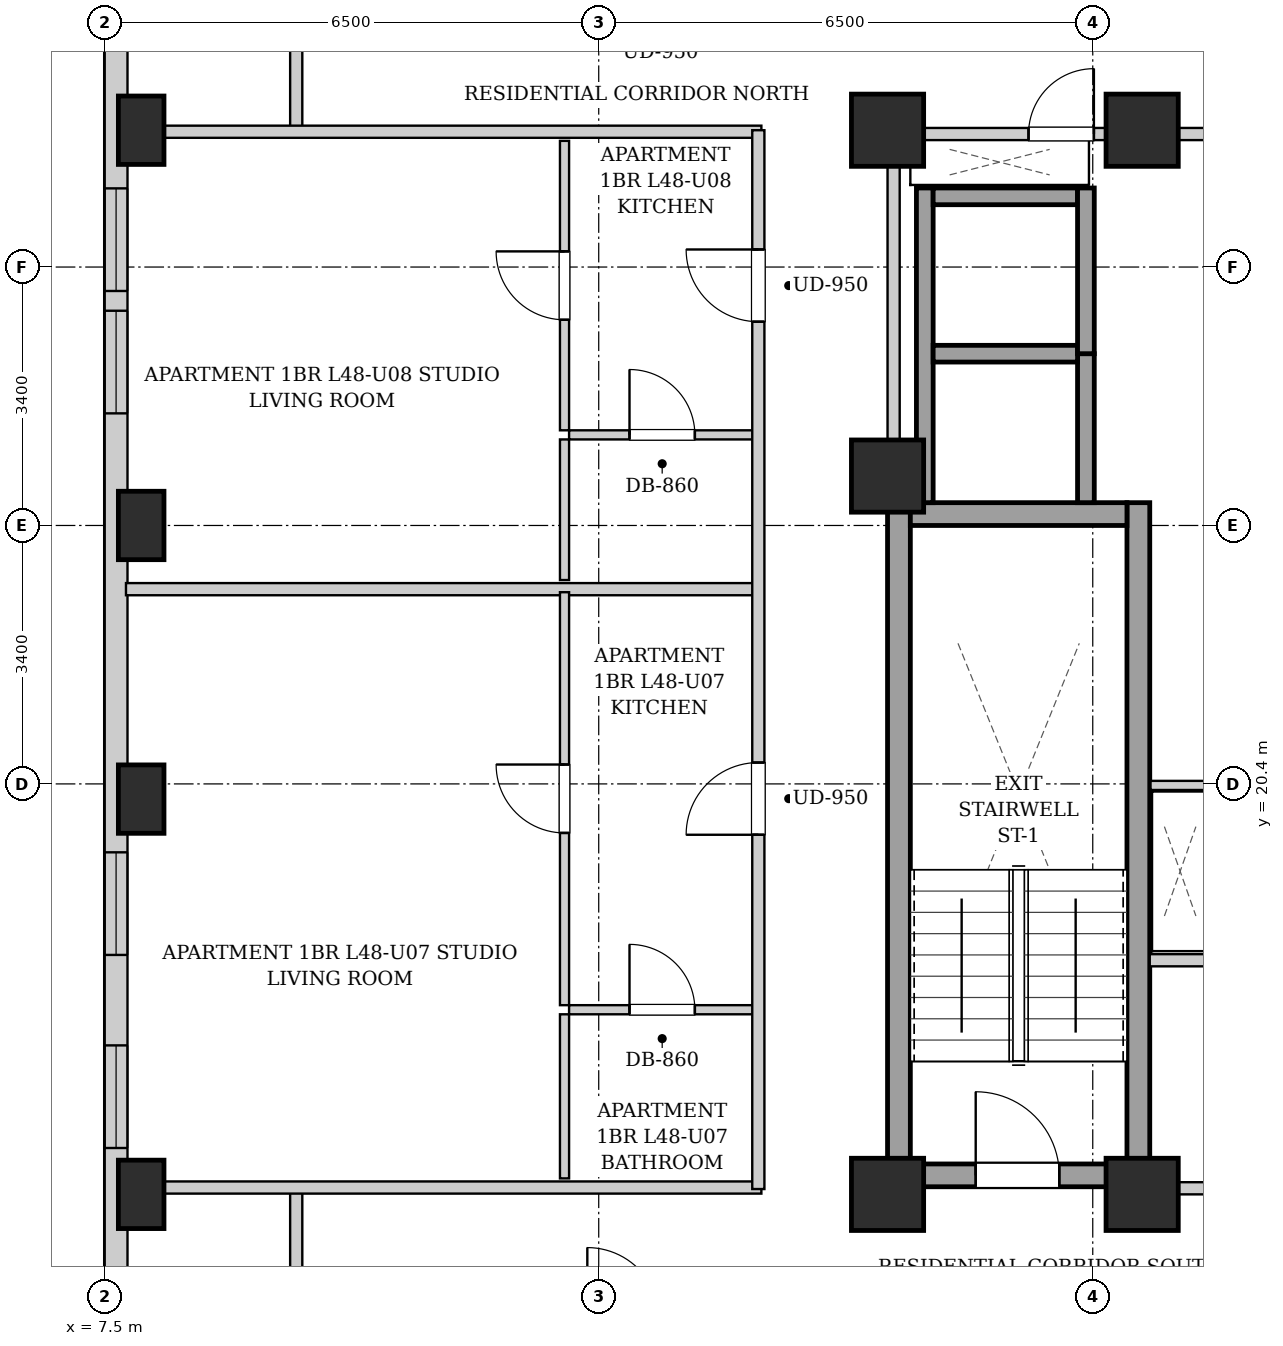
"""IFC4 building model, lengths in metres.
Left out: names, types, materials, properties, quantities, classifications, styles, units other than length and angle.
Written with IfcOpenShell. Run it as: python <this file> out.ifc"""

import sys

from ifc_helpers import new_model, si_unit, direction, frame, frame_2d, origin, origin_2d, place, context, subcontext, project, spatial, rectangle, extrude, element, fill, save


model = new_model("IFC4")
c1 = context("Model", 3, precision=1e-05, world=origin(), true_north=direction((0.0, 1.0)))
c2 = subcontext(c1, "Body", "Model", "MODEL_VIEW")
j1 = project(units=[si_unit("LENGTHUNIT", "METRE"), si_unit("PLANEANGLEUNIT", "RADIAN")], contexts=[c1])
p1 = place(None, origin())
s1 = spatial("IfcSite", under=j1, at=p1, CompositionType="ELEMENT")
p2 = place(p1, origin())
s2 = spatial("IfcBuilding", under=s1, at=p2, CompositionType="ELEMENT")
p3 = place(p2, frame((0.0, 0.0, 166.65)))
s3 = spatial("IfcBuildingStorey", under=s2, at=p3, CompositionType="ELEMENT", Elevation=166.65)
for number, where, z_axis, x_axis in (
    (1, (7.98, 15.0, 0.0), (0.0, 0.0, 1.0), (1.0, 0.0, 0.0)),
    (2, (7.98, 20.2, 0.0), (0.0, 0.0, 1.0), (1.0, 0.0, 0.0)),
    (3, (7.98, 23.8, 0.0), (0.0, 0.0, 1.0), (1.0, 0.0, 0.0)),
    (4, (7.98, 29.0, 0.0), (0.0, 0.0, 1.0), (1.0, 0.0, 0.0)),
):
    element("IfcColumn", number, at=place(p3, frame(where, z_axis=z_axis, x_axis=x_axis)), inside=s3, PredefinedType="COLUMN", context=c2, shape_type="SweptSolid", body=[
        extrude(rectangle(XDim=0.6, YDim=0.9, at=origin_2d()), origin(), (0.0, 0.0, 1.0), 3.25),
    ])
for number, where, z_axis, x_axis in (
    (5, (17.8, 15.0, 0.0), (0.0, 0.0, 1.0), (1.0, 0.0, 0.0)),
    (6, (21.15, 15.0, 0.0), (0.0, 0.0, 1.0), (1.0, 0.0, 0.0)),
    (7, (17.8, 29.0, 0.0), (0.0, 0.0, 1.0), (1.0, 0.0, 0.0)),
    (8, (21.15, 29.0, 0.0), (0.0, 0.0, 1.0), (1.0, 0.0, 0.0)),
    (9, (17.8, 24.45, 0.0), (0.0, 0.0, 1.0), (1.0, 0.0, 0.0)),
):
    element("IfcColumn", number, at=place(p3, frame(where, z_axis=z_axis, x_axis=x_axis)), inside=s3, PredefinedType="COLUMN", context=c2, shape_type="SweptSolid", body=[
        extrude(rectangle(XDim=0.95, YDim=0.95, at=origin_2d()), origin(), (0.0, 0.0, 1.0), 3.25),
    ])
p4 = place(p3, frame((7.65, 6.3, 0.0), z_axis=(0.0, 0.0, 1.0), x_axis=(0.0, 1.0, 0.0)))
e10 = element("IfcWall", 10, at=p4, inside=s3, PredefinedType="SOLIDWALL", context=c2, shape_type="SweptSolid", body=[
    extrude(rectangle(XDim=34.5, YDim=0.3, at=frame_2d((17.25, 0.0))), origin(), (0.0, 0.0, 1.0), 2.93),
])
p5 = place(p4, frame((1.425, 0.0, 0.55)))
e11 = element("IfcOpeningElement", 11, at=p5, cuts=e10, PredefinedType="OPENING", context=c2, shape_type="SweptSolid", body=[
    extrude(rectangle(XDim=1.35, YDim=1.2, at=frame_2d((0.675, 0.6))), frame((0.0, 0.16, 0.0), z_axis=(0.0, -1.0, 0.0), x_axis=(1.0, 0.0, 0.0)), (0.0, 0.0, 1.0), 0.32),
])
p6 = place(p4, frame((30.15, 0.0, 0.55)))
e12 = element("IfcOpeningElement", 12, at=p6, cuts=e10, PredefinedType="OPENING", context=c2, shape_type="SweptSolid", body=[
    extrude(rectangle(XDim=1.35, YDim=1.2, at=frame_2d((0.675, 0.6))), frame((0.0, 0.16, 0.0), z_axis=(0.0, -1.0, 0.0), x_axis=(1.0, 0.0, 0.0)), (0.0, 0.0, 1.0), 0.32),
])
p7 = place(p4, frame((28.31, 0.0, 0.55)))
e13 = element("IfcOpeningElement", 13, at=p7, cuts=e10, PredefinedType="OPENING", context=c2, shape_type="SweptSolid", body=[
    extrude(rectangle(XDim=1.35, YDim=1.2, at=frame_2d((0.675, 0.6))), frame((0.0, 0.16, 0.0), z_axis=(0.0, -1.0, 0.0), x_axis=(1.0, 0.0, 0.0)), (0.0, 0.0, 1.0), 0.32),
])
p8 = place(p4, frame((11.85, 0.0, 0.55)))
e14 = element("IfcOpeningElement", 14, at=p8, cuts=e10, PredefinedType="OPENING", context=c2, shape_type="SweptSolid", body=[
    extrude(rectangle(XDim=1.35, YDim=1.2, at=frame_2d((0.675, 0.6))), frame((0.0, 0.16, 0.0), z_axis=(0.0, -1.0, 0.0), x_axis=(1.0, 0.0, 0.0)), (0.0, 0.0, 1.0), 0.32),
])
p9 = place(p4, frame((9.31, 0.0, 0.55)))
e15 = element("IfcOpeningElement", 15, at=p9, cuts=e10, PredefinedType="OPENING", context=c2, shape_type="SweptSolid", body=[
    extrude(rectangle(XDim=1.35, YDim=1.2, at=frame_2d((0.675, 0.6))), frame((0.0, 0.16, 0.0), z_axis=(0.0, -1.0, 0.0), x_axis=(1.0, 0.0, 0.0)), (0.0, 0.0, 1.0), 0.32),
])
p10 = place(p4, frame((18.975, 0.0, 0.55)))
e16 = element("IfcOpeningElement", 16, at=p10, cuts=e10, PredefinedType="OPENING", context=c2, shape_type="SweptSolid", body=[
    extrude(rectangle(XDim=1.35, YDim=1.2, at=frame_2d((0.675, 0.6))), frame((0.0, 0.16, 0.0), z_axis=(0.0, -1.0, 0.0), x_axis=(1.0, 0.0, 0.0)), (0.0, 0.0, 1.0), 0.32),
])
p11 = place(p4, frame((20.585, 0.0, 0.55)))
e17 = element("IfcOpeningElement", 17, at=p11, cuts=e10, PredefinedType="OPENING", context=c2, shape_type="SweptSolid", body=[
    extrude(rectangle(XDim=1.35, YDim=1.2, at=frame_2d((0.675, 0.6))), frame((0.0, 0.16, 0.0), z_axis=(0.0, -1.0, 0.0), x_axis=(1.0, 0.0, 0.0)), (0.0, 0.0, 1.0), 0.32),
])
for number, where, z_axis, x_axis in (
    (18, (17.95, 15.1, 0.0), (0.0, 0.0, 1.0), (0.0, 1.0, 0.0)),
    (19, (21.1, 15.1, 0.0), (0.0, 0.0, 1.0), (0.0, 1.0, 0.0)),
):
    element("IfcWall", number, at=place(p3, frame(where, z_axis=z_axis, x_axis=x_axis)), inside=s3, PredefinedType="SHEAR", context=c2, shape_type="SweptSolid", body=[
        extrude(rectangle(XDim=9.0, YDim=0.3, at=frame_2d((4.5, 0.0))), origin(), (0.0, 0.0, 1.0), 2.93),
    ])
p12 = place(p3, frame((18.1, 23.95, 0.0), z_axis=(0.0, 0.0, 1.0), x_axis=(1.0, 0.0, 0.0)))
e20 = element("IfcWall", 20, at=p12, inside=s3, PredefinedType="SHEAR", context=c2, shape_type="SweptSolid", body=[
    extrude(rectangle(XDim=2.85, YDim=0.3, at=frame_2d((1.425, 0.0))), origin(), (0.0, 0.0, 1.0), 2.93),
])
p13 = place(p3, frame((18.1, 15.25, 0.0), z_axis=(0.0, 0.0, 1.0), x_axis=(1.0, 0.0, 0.0)))
e21 = element("IfcWall", 21, at=p13, inside=s3, PredefinedType="SHEAR", context=c2, shape_type="SweptSolid", body=[
    extrude(rectangle(XDim=2.85, YDim=0.3, at=frame_2d((1.425, 0.0))), origin(), (0.0, 0.0, 1.0), 2.93),
])
p14 = place(p13, frame((0.86, 0.0, 0.0)))
e22 = element("IfcOpeningElement", 22, at=p14, cuts=e21, PredefinedType="OPENING", context=c2, shape_type="SweptSolid", body=[
    extrude(rectangle(XDim=1.1, YDim=2.05, at=frame_2d((0.55, 1.025))), frame((0.0, 0.16, 0.0), z_axis=(0.0, -1.0, 0.0), x_axis=(1.0, 0.0, 0.0)), (0.0, 0.0, 1.0), 0.32),
])
p15 = place(p3, frame((18.29, 24.1, 0.0), z_axis=(0.0, 0.0, 1.0), x_axis=(0.0, 1.0, 0.0)))
e23 = element("IfcWall", 23, at=p15, inside=s3, PredefinedType="SHEAR", context=c2, shape_type="SweptSolid", body=[
    extrude(rectangle(XDim=4.14, YDim=0.22, at=frame_2d((2.07, 0.0))), origin(), (0.0, 0.0, 1.0), 2.93),
])
p16 = place(p3, frame((20.41, 24.1, 0.0), z_axis=(0.0, 0.0, 1.0), x_axis=(0.0, 1.0, 0.0)))
e24 = element("IfcWall", 24, at=p16, inside=s3, PredefinedType="SHEAR", context=c2, shape_type="SweptSolid", body=[
    extrude(rectangle(XDim=1.96, YDim=0.22, at=frame_2d((0.98, 0.0))), origin(), (0.0, 0.0, 1.0), 2.93),
])
for number, where, z_axis, x_axis in (
    (25, (18.4, 26.06, 0.0), (0.0, 0.0, 1.0), (1.0, 0.0, 0.0)),
    (26, (18.4, 28.13, 0.0), (0.0, 0.0, 1.0), (1.0, 0.0, 0.0)),
):
    element("IfcWall", number, at=place(p3, frame(where, z_axis=z_axis, x_axis=x_axis)), inside=s3, PredefinedType="SHEAR", context=c2, shape_type="SweptSolid", body=[
        extrude(rectangle(XDim=1.9, YDim=0.22, at=frame_2d((0.95, 0.0))), origin(), (0.0, 0.0, 1.0), 2.93),
    ])
p17 = place(p3, frame((20.41, 26.06, 0.0), z_axis=(0.0, 0.0, 1.0), x_axis=(0.0, 1.0, 0.0)))
e27 = element("IfcWall", 27, at=p17, inside=s3, PredefinedType="SHEAR", context=c2, shape_type="SweptSolid", body=[
    extrude(rectangle(XDim=2.18, YDim=0.22, at=frame_2d((1.09, 0.0))), origin(), (0.0, 0.0, 1.0), 2.93),
])
p18 = place(p3, frame((21.25, 15.08, 0.0), z_axis=(0.0, 0.0, 1.0), x_axis=(1.0, 0.0, 0.0)))
e28 = element("IfcWall", 28, at=p18, inside=s3, PredefinedType="PARTITIONING", context=c2, shape_type="SweptSolid", body=[
    extrude(rectangle(XDim=8.5, YDim=0.16, at=frame_2d((4.25, 0.0))), origin(), (0.0, 0.0, 1.0), 2.382),
])
p19 = place(p18, frame((3.725, 0.0, 0.0)))
e29 = element("IfcOpeningElement", 29, at=p19, cuts=e28, PredefinedType="OPENING", context=c2, shape_type="SweptSolid", body=[
    extrude(rectangle(XDim=1.05, YDim=2.05, at=frame_2d((0.525, 1.025))), frame((0.0, 0.09, 0.0), z_axis=(0.0, -1.0, 0.0), x_axis=(1.0, 0.0, 0.0)), (0.0, 0.0, 1.0), 0.18),
])
p20 = place(p3, frame((21.25, 18.08, 0.0), z_axis=(0.0, 0.0, 1.0), x_axis=(1.0, 0.0, 0.0)))
e30 = element("IfcWall", 30, at=p20, inside=s3, PredefinedType="PARTITIONING", context=c2, shape_type="SweptSolid", body=[
    extrude(rectangle(XDim=1.1, YDim=0.16, at=frame_2d((0.55, 0.0))), origin(), (0.0, 0.0, 1.0), 2.93),
])
p21 = place(p3, frame((17.88, 24.12, 0.0), z_axis=(0.0, 0.0, 1.0), x_axis=(0.0, 1.0, 0.0)))
e31 = element("IfcWall", 31, at=p21, inside=s3, PredefinedType="PARTITIONING", context=c2, shape_type="SweptSolid", body=[
    extrude(rectangle(XDim=4.76, YDim=0.16, at=frame_2d((2.38, 0.0))), origin(), (0.0, 0.0, 1.0), 2.265),
])
p22 = place(p3, frame((17.96, 28.95, 0.0), z_axis=(0.0, 0.0, 1.0), x_axis=(1.0, 0.0, 0.0)))
e32 = element("IfcWall", 32, at=p22, inside=s3, PredefinedType="PARTITIONING", context=c2, shape_type="SweptSolid", body=[
    extrude(rectangle(XDim=4.29, YDim=0.16, at=frame_2d((2.145, 0.0))), origin(), (0.0, 0.0, 1.0), 2.382),
])
p23 = place(p22, frame((1.695, 0.0, 0.0)))
e33 = element("IfcOpeningElement", 33, at=p23, cuts=e32, PredefinedType="OPENING", context=c2, shape_type="SweptSolid", body=[
    extrude(rectangle(XDim=0.86, YDim=2.05, at=frame_2d((0.43, 1.025))), frame((0.0, 0.09, 0.0), z_axis=(0.0, -1.0, 0.0), x_axis=(1.0, 0.0, 0.0)), (0.0, 0.0, 1.0), 0.18),
])
p24 = place(p3, frame((22.28, 20.38, 0.0), z_axis=(0.0, 0.0, 1.0), x_axis=(-1.0, 0.0, 0.0)))
e34 = element("IfcWall", 34, at=p24, inside=s3, PredefinedType="PARTITIONING", context=c2, shape_type="SweptSolid", body=[
    extrude(rectangle(XDim=1.02, YDim=0.12, at=frame_2d((0.51, 0.0))), origin(), (0.0, 0.0, 1.0), 2.93),
])
for number, where, z_axis, x_axis in (
    (35, (10.02, 13.35, 0.0), (0.0, 0.0, 1.0), (0.0, 1.0, 0.0)),
    (36, (10.02, 28.98, 0.0), (0.0, 0.0, 1.0), (0.0, 1.0, 0.0)),
):
    element("IfcWall", number, at=place(p3, frame(where, z_axis=z_axis, x_axis=x_axis)), inside=s3, PredefinedType="PARTITIONING", context=c2, shape_type="SweptSolid", body=[
        extrude(rectangle(XDim=1.74, YDim=0.16, at=frame_2d((0.87, 0.0))), origin(), (0.0, 0.0, 1.0), 2.93),
    ])
for number, where, z_axis, x_axis in (
    (37, (7.78, 15.09, 0.0), (0.0, 0.0, 1.0), (1.0, 0.0, 0.0)),
    (38, (7.78, 28.98, 0.0), (0.0, 0.0, 1.0), (1.0, 0.0, 0.0)),
):
    element("IfcWall", number, at=place(p3, frame(where, z_axis=z_axis, x_axis=x_axis)), inside=s3, PredefinedType="PARTITIONING", context=c2, shape_type="SweptSolid", body=[
        extrude(rectangle(XDim=8.36, YDim=0.16, at=frame_2d((4.18, 0.0))), origin(), (0.0, 0.0, 1.0), 2.382),
    ])
p25 = place(p3, frame((7.78, 22.962, 0.0), z_axis=(0.0, 0.0, 1.0), x_axis=(1.0, 0.0, 0.0)))
e39 = element("IfcWall", 39, at=p25, inside=s3, PredefinedType="PARTITIONING", context=c2, shape_type="SweptSolid", body=[
    extrude(rectangle(XDim=8.28, YDim=0.16, at=frame_2d((4.14, 0.0))), origin(), (0.0, 0.0, 1.0), 2.93),
])
p26 = place(p3, frame((13.61, 17.429, 0.0), z_axis=(0.0, 0.0, 1.0), x_axis=(1.0, 0.0, 0.0)))
e40 = element("IfcWall", 40, at=p26, inside=s3, PredefinedType="PARTITIONING", context=c2, shape_type="SweptSolid", body=[
    extrude(rectangle(XDim=2.45, YDim=0.12, at=frame_2d((1.225, 0.0))), origin(), (0.0, 0.0, 1.0), 2.93),
])
p27 = place(p26, frame((0.795, 0.0, 0.0)))
e41 = element("IfcOpeningElement", 41, at=p27, cuts=e40, PredefinedType="OPENING", context=c2, shape_type="SweptSolid", body=[
    extrude(rectangle(XDim=0.86, YDim=2.05, at=frame_2d((0.43, 1.025))), frame((0.0, 0.07, 0.0), z_axis=(0.0, -1.0, 0.0), x_axis=(1.0, 0.0, 0.0)), (0.0, 0.0, 1.0), 0.14),
])
p28 = place(p3, frame((13.55, 15.21, 0.0), z_axis=(0.0, 0.0, 1.0), x_axis=(0.0, 1.0, 0.0)))
e42 = element("IfcWall", 42, at=p28, inside=s3, PredefinedType="PARTITIONING", context=c2, shape_type="SweptSolid", body=[
    extrude(rectangle(XDim=2.159, YDim=0.12, at=frame_2d((1.08, 0.0))), origin(), (0.0, 0.0, 1.0), 2.93),
])
p29 = place(p3, frame((13.55, 17.489, 0.0), z_axis=(0.0, 0.0, 1.0), x_axis=(0.0, 1.0, 0.0)))
e43 = element("IfcWall", 43, at=p29, inside=s3, PredefinedType="PARTITIONING", context=c2, shape_type="SweptSolid", body=[
    extrude(rectangle(XDim=5.433, YDim=0.12, at=frame_2d((2.717, 0.0))), origin(), (0.0, 0.0, 1.0), 2.93),
])
p30 = place(p29, frame((2.266, 0.0, 0.0)))
e44 = element("IfcOpeningElement", 44, at=p30, cuts=e43, PredefinedType="OPENING", context=c2, shape_type="SweptSolid", body=[
    extrude(rectangle(XDim=0.9, YDim=2.05, at=frame_2d((0.45, 1.025))), frame((0.0, 0.07, 0.0), z_axis=(0.0, -1.0, 0.0), x_axis=(1.0, 0.0, 0.0)), (0.0, 0.0, 1.0), 0.14),
])
p31 = place(p3, frame((13.61, 24.992, 0.0), z_axis=(0.0, 0.0, 1.0), x_axis=(1.0, 0.0, 0.0)))
e45 = element("IfcWall", 45, at=p31, inside=s3, PredefinedType="PARTITIONING", context=c2, shape_type="SweptSolid", body=[
    extrude(rectangle(XDim=2.45, YDim=0.12, at=frame_2d((1.225, 0.0))), origin(), (0.0, 0.0, 1.0), 2.93),
])
p32 = place(p31, frame((0.795, 0.0, 0.0)))
e46 = element("IfcOpeningElement", 46, at=p32, cuts=e45, PredefinedType="OPENING", context=c2, shape_type="SweptSolid", body=[
    extrude(rectangle(XDim=0.86, YDim=2.05, at=frame_2d((0.43, 1.025))), frame((0.0, 0.07, 0.0), z_axis=(0.0, -1.0, 0.0), x_axis=(1.0, 0.0, 0.0)), (0.0, 0.0, 1.0), 0.14),
])
p33 = place(p3, frame((13.55, 23.082, 0.0), z_axis=(0.0, 0.0, 1.0), x_axis=(0.0, 1.0, 0.0)))
e47 = element("IfcWall", 47, at=p33, inside=s3, PredefinedType="PARTITIONING", context=c2, shape_type="SweptSolid", body=[
    extrude(rectangle(XDim=1.85, YDim=0.12, at=frame_2d((0.925, 0.0))), origin(), (0.0, 0.0, 1.0), 2.93),
])
p34 = place(p3, frame((13.55, 25.052, 0.0), z_axis=(0.0, 0.0, 1.0), x_axis=(0.0, 1.0, 0.0)))
e48 = element("IfcWall", 48, at=p34, inside=s3, PredefinedType="PARTITIONING", context=c2, shape_type="SweptSolid", body=[
    extrude(rectangle(XDim=3.808, YDim=0.12, at=frame_2d((1.904, 0.0))), origin(), (0.0, 0.0, 1.0), 2.93),
])
p35 = place(p34, frame((1.454, 0.0, 0.0)))
e49 = element("IfcOpeningElement", 49, at=p35, cuts=e48, PredefinedType="OPENING", context=c2, shape_type="SweptSolid", body=[
    extrude(rectangle(XDim=0.9, YDim=2.05, at=frame_2d((0.45, 1.025))), frame((0.0, 0.07, 0.0), z_axis=(0.0, -1.0, 0.0), x_axis=(1.0, 0.0, 0.0)), (0.0, 0.0, 1.0), 0.14),
])
p36 = place(p3, frame((16.1, 15.07, 0.0), z_axis=(0.0, 0.0, 1.0), x_axis=(0.0, 1.0, 0.0)))
e50 = element("IfcWall", 50, at=p36, inside=s3, PredefinedType="PARTITIONING", context=c2, shape_type="SweptSolid", body=[
    extrude(rectangle(XDim=13.93, YDim=0.16, at=frame_2d((6.965, 0.0))), origin(), (0.0, 0.0, 1.0), 2.93),
])
p37 = place(p36, frame((4.661, 0.0, 0.0)))
e51 = element("IfcOpeningElement", 51, at=p37, cuts=e50, PredefinedType="OPENING", context=c2, shape_type="SweptSolid", body=[
    extrude(rectangle(XDim=0.95, YDim=2.1, at=frame_2d((0.475, 1.05))), frame((0.0, 0.09, 0.0), z_axis=(0.0, -1.0, 0.0), x_axis=(1.0, 0.0, 0.0)), (0.0, 0.0, 1.0), 0.18),
])
p38 = place(p36, frame((11.411, 0.0, 0.0)))
e52 = element("IfcOpeningElement", 52, at=p38, cuts=e50, PredefinedType="OPENING", context=c2, shape_type="SweptSolid", body=[
    extrude(rectangle(XDim=0.95, YDim=2.1, at=frame_2d((0.475, 1.05))), frame((0.0, 0.09, 0.0), z_axis=(0.0, -1.0, 0.0), x_axis=(1.0, 0.0, 0.0)), (0.0, 0.0, 1.0), 0.18),
])
p39 = place(p14, origin())
e53 = element("IfcDoor", 53, at=p39, inside=s3, OperationType="SINGLE_SWING_LEFT", PredefinedType="DOOR", context=c2, shape_type="SweptSolid", body=[
    extrude(rectangle(XDim=1.1, YDim=2.05, at=frame_2d((0.55, 1.025))), frame((0.0, 0.025, 0.0), z_axis=(0.0, -1.0, 0.0), x_axis=(1.0, 0.0, 0.0)), (0.0, 0.0, 1.0), 0.05),
])
fill(e22, e53)
p40 = place(p23, origin())
e54 = element("IfcDoor", 54, at=p40, inside=s3, OperationType="SINGLE_SWING_RIGHT", PredefinedType="DOOR", context=c2, shape_type="SweptSolid", body=[
    extrude(rectangle(XDim=0.86, YDim=2.05, at=frame_2d((0.43, 1.025))), frame((0.0, 0.025, 0.0), z_axis=(0.0, -1.0, 0.0), x_axis=(1.0, 0.0, 0.0)), (0.0, 0.0, 1.0), 0.05),
])
fill(e33, e54)
p41 = place(p27, origin())
e55 = element("IfcDoor", 55, at=p41, inside=s3, OperationType="SINGLE_SWING_LEFT", PredefinedType="DOOR", context=c2, shape_type="SweptSolid", body=[
    extrude(rectangle(XDim=0.86, YDim=2.05, at=frame_2d((0.43, 1.025))), frame((0.0, 0.025, 0.0), z_axis=(0.0, -1.0, 0.0), x_axis=(1.0, 0.0, 0.0)), (0.0, 0.0, 1.0), 0.05),
])
fill(e41, e55)
p42 = place(p30, origin())
e56 = element("IfcDoor", 56, at=p42, inside=s3, OperationType="SINGLE_SWING_RIGHT", PredefinedType="DOOR", context=c2, shape_type="SweptSolid", body=[
    extrude(rectangle(XDim=0.9, YDim=2.05, at=frame_2d((0.45, 1.025))), frame((0.0, 0.025, 0.0), z_axis=(0.0, -1.0, 0.0), x_axis=(1.0, 0.0, 0.0)), (0.0, 0.0, 1.0), 0.05),
])
fill(e44, e56)
p43 = place(p32, origin())
e57 = element("IfcDoor", 57, at=p43, inside=s3, OperationType="SINGLE_SWING_LEFT", PredefinedType="DOOR", context=c2, shape_type="SweptSolid", body=[
    extrude(rectangle(XDim=0.86, YDim=2.05, at=frame_2d((0.43, 1.025))), frame((0.0, 0.025, 0.0), z_axis=(0.0, -1.0, 0.0), x_axis=(1.0, 0.0, 0.0)), (0.0, 0.0, 1.0), 0.05),
])
fill(e46, e57)
p44 = place(p35, origin())
e58 = element("IfcDoor", 58, at=p44, inside=s3, OperationType="SINGLE_SWING_RIGHT", PredefinedType="DOOR", context=c2, shape_type="SweptSolid", body=[
    extrude(rectangle(XDim=0.9, YDim=2.05, at=frame_2d((0.45, 1.025))), frame((0.0, 0.025, 0.0), z_axis=(0.0, -1.0, 0.0), x_axis=(1.0, 0.0, 0.0)), (0.0, 0.0, 1.0), 0.05),
])
fill(e49, e58)
p45 = place(p37, origin())
e59 = element("IfcDoor", 59, at=p45, inside=s3, OperationType="SINGLE_SWING_LEFT", PredefinedType="DOOR", context=c2, shape_type="SweptSolid", body=[
    extrude(rectangle(XDim=0.95, YDim=2.1, at=frame_2d((0.475, 1.05))), frame((0.0, 0.025, 0.0), z_axis=(0.0, -1.0, 0.0), x_axis=(1.0, 0.0, 0.0)), (0.0, 0.0, 1.0), 0.05),
])
fill(e51, e59)
p46 = place(p38, origin())
e60 = element("IfcDoor", 60, at=p46, inside=s3, OperationType="SINGLE_SWING_RIGHT", PredefinedType="DOOR", context=c2, shape_type="SweptSolid", body=[
    extrude(rectangle(XDim=0.95, YDim=2.1, at=frame_2d((0.475, 1.05))), frame((0.0, 0.025, 0.0), z_axis=(0.0, -1.0, 0.0), x_axis=(1.0, 0.0, 0.0)), (0.0, 0.0, 1.0), 0.05),
])
fill(e52, e60)
p47 = place(p8, origin())
e61 = element("IfcWindow", 61, at=p47, inside=s3, PartitioningType="SINGLE_PANEL", PredefinedType="WINDOW", context=c2, shape_type="SweptSolid", body=[
    extrude(rectangle(XDim=1.35, YDim=1.2, at=frame_2d((0.675, 0.6))), frame((0.0, 0.03, 0.0), z_axis=(0.0, -1.0, 0.0), x_axis=(1.0, 0.0, 0.0)), (0.0, 0.0, 1.0), 0.06),
])
fill(e14, e61)
p48 = place(p9, origin())
e62 = element("IfcWindow", 62, at=p48, inside=s3, PartitioningType="SINGLE_PANEL", PredefinedType="WINDOW", context=c2, shape_type="SweptSolid", body=[
    extrude(rectangle(XDim=1.35, YDim=1.2, at=frame_2d((0.675, 0.6))), frame((0.0, 0.03, 0.0), z_axis=(0.0, -1.0, 0.0), x_axis=(1.0, 0.0, 0.0)), (0.0, 0.0, 1.0), 0.06),
])
fill(e15, e62)
p49 = place(p10, origin())
e63 = element("IfcWindow", 63, at=p49, inside=s3, PartitioningType="SINGLE_PANEL", PredefinedType="WINDOW", context=c2, shape_type="SweptSolid", body=[
    extrude(rectangle(XDim=1.35, YDim=1.2, at=frame_2d((0.675, 0.6))), frame((0.0, 0.03, 0.0), z_axis=(0.0, -1.0, 0.0), x_axis=(1.0, 0.0, 0.0)), (0.0, 0.0, 1.0), 0.06),
])
fill(e16, e63)
p50 = place(p11, origin())
e64 = element("IfcWindow", 64, at=p50, inside=s3, PartitioningType="SINGLE_PANEL", PredefinedType="WINDOW", context=c2, shape_type="SweptSolid", body=[
    extrude(rectangle(XDim=1.35, YDim=1.2, at=frame_2d((0.675, 0.6))), frame((0.0, 0.03, 0.0), z_axis=(0.0, -1.0, 0.0), x_axis=(1.0, 0.0, 0.0)), (0.0, 0.0, 1.0), 0.06),
])
fill(e17, e64)
save(model, sys.argv[1])
